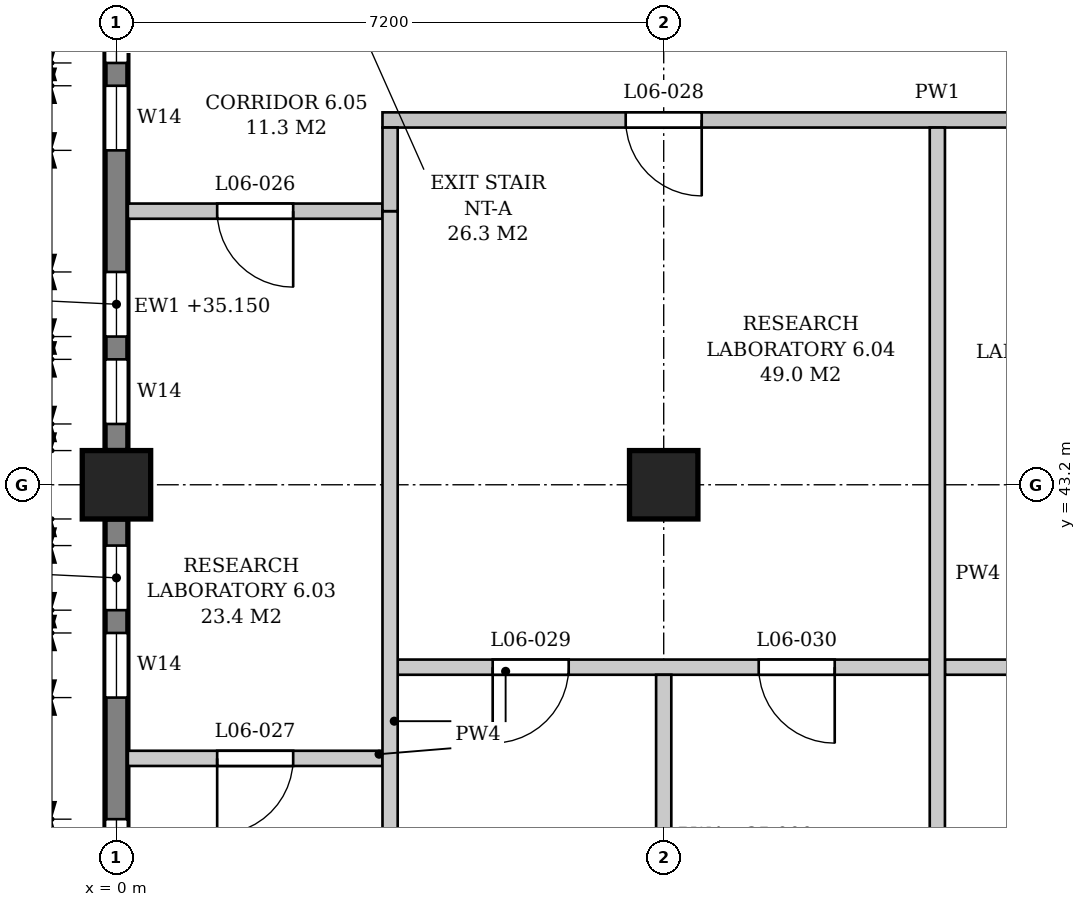
"""IFC4 building model, lengths in metres.
Left out: names, types, materials, properties, quantities, classifications, styles, units other than length and angle.
Written with IfcOpenShell. Run it as: python <this file> out.ifc"""

import sys

from ifc_helpers import new_model, si_unit, direction, frame, frame_2d, origin, origin_2d, place, context, subcontext, project, spatial, polyline, rectangle, outline, extrude, element, fill, save


model = new_model("IFC4")
c1 = context("Model", 3, precision=1e-05, world=origin(), true_north=direction((0.0, 1.0)))
c2 = subcontext(c1, "Body", "Model", "MODEL_VIEW")
j1 = project(units=[si_unit("LENGTHUNIT", "METRE"), si_unit("PLANEANGLEUNIT", "RADIAN")], contexts=[c1])
p1 = place(None, origin())
s1 = spatial("IfcSite", under=j1, at=p1, CompositionType="ELEMENT")
p2 = place(p1, origin())
s2 = spatial("IfcBuilding", under=s1, at=p2, CompositionType="ELEMENT")
p3 = place(p2, frame((0.0, 0.0, 31.2)))
s3 = spatial("IfcBuildingStorey", under=s2, at=p3, CompositionType="ELEMENT", Elevation=31.2)
for number, where, z_axis, x_axis in (
    (1, (0.0, 43.2, 0.0), (0.0, 0.0, 1.0), (1.0, 0.0, 0.0)),
    (2, (7.2, 43.2, 0.0), (0.0, 0.0, 1.0), (1.0, 0.0, 0.0)),
):
    element("IfcColumn", number, at=place(p3, frame(where, z_axis=z_axis, x_axis=x_axis)), inside=s3, PredefinedType="COLUMN", context=c2, shape_type="SweptSolid", body=[
        extrude(rectangle(XDim=0.9, YDim=0.9, at=origin_2d()), origin(), (0.0, 0.0, 1.0), 4.8),
    ])
p4 = place(p3, frame((0.0, 36.45, 0.0), z_axis=(0.0, 0.0, 1.0), x_axis=(0.0, 1.0, 0.0)))
e3 = element("IfcWall", 3, at=p4, inside=s3, PredefinedType="STANDARD", context=c2, shape_type="SweptSolid", body=[
    extrude(rectangle(XDim=6.3, YDim=0.3, at=frame_2d((3.15, 0.0))), origin(), (0.0, 0.0, 1.0), 3.95),
])
p5 = place(p4, frame((0.35, 0.0, 0.9)))
e4 = element("IfcOpeningElement", 4, at=p5, cuts=e3, PredefinedType="OPENING", context=c2, shape_type="SweptSolid", body=[
    extrude(outline(polyline([(0.0, 0.0), (0.85, 0.0), (0.85, 2.05), (0.425, 2.5), (0.0, 2.05), (0.0, 0.0)])), frame((0.0, 0.16, 0.0), z_axis=(0.0, -1.0, 0.0), x_axis=(1.0, 0.0, 0.0)), (0.0, 0.0, 1.0), 0.32),
])
p6 = place(p4, frame((1.5, 0.0, 0.9)))
e5 = element("IfcOpeningElement", 5, at=p6, cuts=e3, PredefinedType="OPENING", context=c2, shape_type="SweptSolid", body=[
    extrude(outline(polyline([(0.0, 0.0), (0.85, 0.0), (0.85, 2.05), (0.425, 2.5), (0.0, 2.05), (0.0, 0.0)])), frame((0.0, 0.16, 0.0), z_axis=(0.0, -1.0, 0.0), x_axis=(1.0, 0.0, 0.0)), (0.0, 0.0, 1.0), 0.32),
])
p7 = place(p4, frame((3.95, 0.0, 0.9)))
e6 = element("IfcOpeningElement", 6, at=p7, cuts=e3, PredefinedType="OPENING", context=c2, shape_type="SweptSolid", body=[
    extrude(outline(polyline([(0.0, 0.0), (0.85, 0.0), (0.85, 2.05), (0.425, 2.5), (0.0, 2.05), (0.0, 0.0)])), frame((0.0, 0.16, 0.0), z_axis=(0.0, -1.0, 0.0), x_axis=(1.0, 0.0, 0.0)), (0.0, 0.0, 1.0), 0.32),
])
p8 = place(p4, frame((5.1, 0.0, 0.9)))
e7 = element("IfcOpeningElement", 7, at=p8, cuts=e3, PredefinedType="OPENING", context=c2, shape_type="SweptSolid", body=[
    extrude(outline(polyline([(0.0, 0.0), (0.85, 0.0), (0.85, 2.05), (0.425, 2.5), (0.0, 2.05), (0.0, 0.0)])), frame((0.0, 0.16, 0.0), z_axis=(0.0, -1.0, 0.0), x_axis=(1.0, 0.0, 0.0)), (0.0, 0.0, 1.0), 0.32),
])
p9 = place(p3, frame((0.0, 43.65, 0.0), z_axis=(0.0, 0.0, 1.0), x_axis=(0.0, 1.0, 0.0)))
e8 = element("IfcWall", 8, at=p9, inside=s3, PredefinedType="STANDARD", context=c2, shape_type="SweptSolid", body=[
    extrude(rectangle(XDim=6.3, YDim=0.3, at=frame_2d((3.15, 0.0))), origin(), (0.0, 0.0, 1.0), 3.95),
])
p10 = place(p9, frame((0.35, 0.0, 0.9)))
e9 = element("IfcOpeningElement", 9, at=p10, cuts=e8, PredefinedType="OPENING", context=c2, shape_type="SweptSolid", body=[
    extrude(outline(polyline([(0.0, 0.0), (0.85, 0.0), (0.85, 2.05), (0.425, 2.5), (0.0, 2.05), (0.0, 0.0)])), frame((0.0, 0.16, 0.0), z_axis=(0.0, -1.0, 0.0), x_axis=(1.0, 0.0, 0.0)), (0.0, 0.0, 1.0), 0.32),
])
p11 = place(p9, frame((1.5, 0.0, 0.9)))
e10 = element("IfcOpeningElement", 10, at=p11, cuts=e8, PredefinedType="OPENING", context=c2, shape_type="SweptSolid", body=[
    extrude(outline(polyline([(0.0, 0.0), (0.85, 0.0), (0.85, 2.05), (0.425, 2.5), (0.0, 2.05), (0.0, 0.0)])), frame((0.0, 0.16, 0.0), z_axis=(0.0, -1.0, 0.0), x_axis=(1.0, 0.0, 0.0)), (0.0, 0.0, 1.0), 0.32),
])
p12 = place(p9, frame((3.95, 0.0, 0.9)))
e11 = element("IfcOpeningElement", 11, at=p12, cuts=e8, PredefinedType="OPENING", context=c2, shape_type="SweptSolid", body=[
    extrude(outline(polyline([(0.0, 0.0), (0.85, 0.0), (0.85, 2.05), (0.425, 2.5), (0.0, 2.05), (0.0, 0.0)])), frame((0.0, 0.16, 0.0), z_axis=(0.0, -1.0, 0.0), x_axis=(1.0, 0.0, 0.0)), (0.0, 0.0, 1.0), 0.32),
])
p13 = place(p9, frame((5.1, 0.0, 0.9)))
e12 = element("IfcOpeningElement", 12, at=p13, cuts=e8, PredefinedType="OPENING", context=c2, shape_type="SweptSolid", body=[
    extrude(outline(polyline([(0.0, 0.0), (0.85, 0.0), (0.85, 2.05), (0.425, 2.5), (0.0, 2.05), (0.0, 0.0)])), frame((0.0, 0.16, 0.0), z_axis=(0.0, -1.0, 0.0), x_axis=(1.0, 0.0, 0.0)), (0.0, 0.0, 1.0), 0.32),
])
p14 = place(p3, frame((0.15, 39.6, 0.0), z_axis=(0.0, 0.0, 1.0), x_axis=(1.0, 0.0, 0.0)))
e13 = element("IfcWall", 13, at=p14, inside=s3, PredefinedType="PARTITIONING", context=c2, shape_type="SweptSolid", body=[
    extrude(outline(polyline([(0.0, 0.0), (3.35, 0.0), (3.35, 4.55), (0.1, 4.55), (0.1, 3.95), (0.0, 3.95), (0.0, 0.0)])), frame((0.0, 0.1, 0.0), z_axis=(0.0, -1.0, 0.0), x_axis=(1.0, 0.0, 0.0)), (0.0, 0.0, 1.0), 0.2),
])
p15 = place(p14, frame((1.175, 0.0, 0.0)))
e14 = element("IfcOpeningElement", 14, at=p15, cuts=e13, PredefinedType="OPENING", context=c2, shape_type="SweptSolid", body=[
    extrude(rectangle(XDim=1.0, YDim=2.1, at=frame_2d((0.5, 1.05))), frame((0.0, 0.11, 0.0), z_axis=(0.0, -1.0, 0.0), x_axis=(1.0, 0.0, 0.0)), (0.0, 0.0, 1.0), 0.22),
])
p16 = place(p3, frame((3.7, 40.8, 0.0), z_axis=(0.0, 0.0, 1.0), x_axis=(1.0, 0.0, 0.0)))
e15 = element("IfcWall", 15, at=p16, inside=s3, PredefinedType="PARTITIONING", context=c2, shape_type="SweptSolid", body=[
    extrude(outline(polyline([(0.0, 0.0), (7.0, 0.0), (7.0, 4.55), (3.75, 4.55), (3.75, 3.8), (3.25, 3.8), (3.25, 4.55), (0.0, 4.55), (0.0, 0.0)])), frame((0.0, 0.1, 0.0), z_axis=(0.0, -1.0, 0.0), x_axis=(1.0, 0.0, 0.0)), (0.0, 0.0, 1.0), 0.2),
])
p17 = place(p16, frame((1.25, 0.0, 0.0)))
e16 = element("IfcOpeningElement", 16, at=p17, cuts=e15, PredefinedType="OPENING", context=c2, shape_type="SweptSolid", body=[
    extrude(rectangle(XDim=1.0, YDim=2.1, at=frame_2d((0.5, 1.05))), frame((0.0, 0.11, 0.0), z_axis=(0.0, -1.0, 0.0), x_axis=(1.0, 0.0, 0.0)), (0.0, 0.0, 1.0), 0.22),
])
p18 = place(p16, frame((4.75, 0.0, 0.0)))
e17 = element("IfcOpeningElement", 17, at=p18, cuts=e15, PredefinedType="OPENING", context=c2, shape_type="SweptSolid", body=[
    extrude(rectangle(XDim=1.0, YDim=2.1, at=frame_2d((0.5, 1.05))), frame((0.0, 0.11, 0.0), z_axis=(0.0, -1.0, 0.0), x_axis=(1.0, 0.0, 0.0)), (0.0, 0.0, 1.0), 0.22),
])
p19 = place(p3, frame((10.9, 40.8, 0.0), z_axis=(0.0, 0.0, 1.0), x_axis=(1.0, 0.0, 0.0)))
e18 = element("IfcWall", 18, at=p19, inside=s3, PredefinedType="PARTITIONING", context=c2, shape_type="SweptSolid", body=[
    extrude(outline(polyline([(0.0, 0.0), (3.4, 0.0), (3.4, 3.8), (3.25, 3.8), (3.25, 4.55), (0.0, 4.55), (0.0, 0.0)])), frame((0.0, 0.1, 0.0), z_axis=(0.0, -1.0, 0.0), x_axis=(1.0, 0.0, 0.0)), (0.0, 0.0, 1.0), 0.2),
])
p20 = place(p19, frame((1.2, 0.0, 0.0)))
e19 = element("IfcOpeningElement", 19, at=p20, cuts=e18, PredefinedType="OPENING", context=c2, shape_type="SweptSolid", body=[
    extrude(rectangle(XDim=1.0, YDim=2.1, at=frame_2d((0.5, 1.05))), frame((0.0, 0.11, 0.0), z_axis=(0.0, -1.0, 0.0), x_axis=(1.0, 0.0, 0.0)), (0.0, 0.0, 1.0), 0.22),
])
p21 = place(p3, frame((0.15, 46.8, 0.0), z_axis=(0.0, 0.0, 1.0), x_axis=(1.0, 0.0, 0.0)))
e20 = element("IfcWall", 20, at=p21, inside=s3, PredefinedType="PARTITIONING", context=c2, shape_type="SweptSolid", body=[
    extrude(outline(polyline([(0.0, 0.0), (3.35, 0.0), (3.35, 4.55), (0.1, 4.55), (0.1, 3.95), (0.0, 3.95), (0.0, 0.0)])), frame((0.0, 0.1, 0.0), z_axis=(0.0, -1.0, 0.0), x_axis=(1.0, 0.0, 0.0)), (0.0, 0.0, 1.0), 0.2),
])
p22 = place(p21, frame((1.175, 0.0, 0.0)))
e21 = element("IfcOpeningElement", 21, at=p22, cuts=e20, PredefinedType="OPENING", context=c2, shape_type="SweptSolid", body=[
    extrude(rectangle(XDim=1.0, YDim=2.1, at=frame_2d((0.5, 1.05))), frame((0.0, 0.11, 0.0), z_axis=(0.0, -1.0, 0.0), x_axis=(1.0, 0.0, 0.0)), (0.0, 0.0, 1.0), 0.22),
])
p23 = place(p3, frame((3.5, 48.0, 0.0), z_axis=(0.0, 0.0, 1.0), x_axis=(1.0, 0.0, 0.0)))
e22 = element("IfcWall", 22, at=p23, inside=s3, PredefinedType="PARTITIONING", context=c2, shape_type="SweptSolid", body=[
    extrude(outline(polyline([(0.0, 0.0), (14.6, 0.0), (14.6, 4.55), (11.15, 4.55), (11.15, 3.8), (10.65, 3.8), (10.65, 4.55), (3.95, 4.55), (3.95, 3.8), (3.45, 3.8), (3.45, 4.55), (0.0, 4.55), (0.0, 0.0)])), frame((0.0, 0.1, 0.0), z_axis=(0.0, -1.0, 0.0), x_axis=(1.0, 0.0, 0.0)), (0.0, 0.0, 1.0), 0.2),
])
p24 = place(p23, frame((3.2, 0.0, 0.0)))
e23 = element("IfcOpeningElement", 23, at=p24, cuts=e22, PredefinedType="OPENING", context=c2, shape_type="SweptSolid", body=[
    extrude(rectangle(XDim=1.0, YDim=2.1, at=frame_2d((0.5, 1.05))), frame((0.0, 0.11, 0.0), z_axis=(0.0, -1.0, 0.0), x_axis=(1.0, 0.0, 0.0)), (0.0, 0.0, 1.0), 0.22),
])
p25 = place(p23, frame((8.6, 0.0, 0.0)))
e24 = element("IfcOpeningElement", 24, at=p25, cuts=e22, PredefinedType="OPENING", context=c2, shape_type="SweptSolid", body=[
    extrude(rectangle(XDim=1.0, YDim=2.1, at=frame_2d((0.5, 1.05))), frame((0.0, 0.11, 0.0), z_axis=(0.0, -1.0, 0.0), x_axis=(1.0, 0.0, 0.0)), (0.0, 0.0, 1.0), 0.22),
])
p26 = place(p3, frame((3.6, 36.15, 0.0), z_axis=(0.0, 0.0, 1.0), x_axis=(0.0, 1.0, 0.0)))
e25 = element("IfcWall", 25, at=p26, inside=s3, PredefinedType="PARTITIONING", context=c2, shape_type="SweptSolid", body=[
    extrude(outline(polyline([(0.0, 0.0), (10.65, 0.0), (10.65, 4.55), (7.3, 4.55), (7.3, 3.8), (6.8, 3.8), (6.8, 4.55), (0.1, 4.55), (0.1, 3.95), (0.0, 3.95), (0.0, 0.0)])), frame((0.0, 0.1, 0.0), z_axis=(0.0, -1.0, 0.0), x_axis=(1.0, 0.0, 0.0)), (0.0, 0.0, 1.0), 0.2),
])
p27 = place(p3, frame((3.6, 46.8, 0.0), z_axis=(0.0, 0.0, 1.0), x_axis=(0.0, 1.0, 0.0)))
e26 = element("IfcWall", 26, at=p27, inside=s3, PredefinedType="PARTITIONING", context=c2, shape_type="SweptSolid", body=[
    extrude(rectangle(XDim=1.1, YDim=0.2, at=frame_2d((0.55, 0.0))), origin(), (0.0, 0.0, 1.0), 4.55),
])
p28 = place(p3, frame((7.2, 36.45, 0.0), z_axis=(0.0, 0.0, 1.0), x_axis=(0.0, 1.0, 0.0)))
e27 = element("IfcWall", 27, at=p28, inside=s3, PredefinedType="PARTITIONING", context=c2, shape_type="SweptSolid", body=[
    extrude(rectangle(XDim=4.25, YDim=0.2, at=frame_2d((2.125, 0.0))), origin(), (0.0, 0.0, 1.0), 3.8),
])
p29 = place(p3, frame((10.8, 36.15, 0.0), z_axis=(0.0, 0.0, 1.0), x_axis=(0.0, 1.0, 0.0)))
e28 = element("IfcWall", 28, at=p29, inside=s3, PredefinedType="PARTITIONING", context=c2, shape_type="SweptSolid", body=[
    extrude(outline(polyline([(0.0, 0.0), (11.75, 0.0), (11.75, 4.55), (7.3, 4.55), (7.3, 3.8), (6.8, 3.8), (6.8, 4.55), (0.1, 4.55), (0.1, 3.95), (0.0, 3.95), (0.0, 0.0)])), frame((0.0, 0.1, 0.0), z_axis=(0.0, -1.0, 0.0), x_axis=(1.0, 0.0, 0.0)), (0.0, 0.0, 1.0), 0.2),
])
p30 = place(p6, origin())
e29 = element("IfcWindow", 29, at=p30, inside=s3, PartitioningType="SINGLE_PANEL", PredefinedType="WINDOW", context=c2, shape_type="SweptSolid", body=[
    extrude(outline(polyline([(0.0, 0.0), (0.85, 0.0), (0.85, 2.05), (0.425, 2.5), (0.0, 2.05), (0.0, 0.0)])), frame((0.0, 0.03, 0.0), z_axis=(0.0, -1.0, 0.0), x_axis=(1.0, 0.0, 0.0)), (0.0, 0.0, 1.0), 0.06),
])
fill(e5, e29)
p31 = place(p7, origin())
e30 = element("IfcWindow", 30, at=p31, inside=s3, PartitioningType="SINGLE_PANEL", PredefinedType="WINDOW", context=c2, shape_type="SweptSolid", body=[
    extrude(outline(polyline([(0.0, 0.0), (0.85, 0.0), (0.85, 2.05), (0.425, 2.5), (0.0, 2.05), (0.0, 0.0)])), frame((0.0, 0.03, 0.0), z_axis=(0.0, -1.0, 0.0), x_axis=(1.0, 0.0, 0.0)), (0.0, 0.0, 1.0), 0.06),
])
fill(e6, e30)
p32 = place(p8, origin())
e31 = element("IfcWindow", 31, at=p32, inside=s3, PartitioningType="SINGLE_PANEL", PredefinedType="WINDOW", context=c2, shape_type="SweptSolid", body=[
    extrude(outline(polyline([(0.0, 0.0), (0.85, 0.0), (0.85, 2.05), (0.425, 2.5), (0.0, 2.05), (0.0, 0.0)])), frame((0.0, 0.03, 0.0), z_axis=(0.0, -1.0, 0.0), x_axis=(1.0, 0.0, 0.0)), (0.0, 0.0, 1.0), 0.06),
])
fill(e7, e31)
p33 = place(p10, origin())
e32 = element("IfcWindow", 32, at=p33, inside=s3, PartitioningType="SINGLE_PANEL", PredefinedType="WINDOW", context=c2, shape_type="SweptSolid", body=[
    extrude(outline(polyline([(0.0, 0.0), (0.85, 0.0), (0.85, 2.05), (0.425, 2.5), (0.0, 2.05), (0.0, 0.0)])), frame((0.0, 0.03, 0.0), z_axis=(0.0, -1.0, 0.0), x_axis=(1.0, 0.0, 0.0)), (0.0, 0.0, 1.0), 0.06),
])
fill(e9, e32)
p34 = place(p11, origin())
e33 = element("IfcWindow", 33, at=p34, inside=s3, PartitioningType="SINGLE_PANEL", PredefinedType="WINDOW", context=c2, shape_type="SweptSolid", body=[
    extrude(outline(polyline([(0.0, 0.0), (0.85, 0.0), (0.85, 2.05), (0.425, 2.5), (0.0, 2.05), (0.0, 0.0)])), frame((0.0, 0.03, 0.0), z_axis=(0.0, -1.0, 0.0), x_axis=(1.0, 0.0, 0.0)), (0.0, 0.0, 1.0), 0.06),
])
fill(e10, e33)
p35 = place(p12, origin())
e34 = element("IfcWindow", 34, at=p35, inside=s3, PartitioningType="SINGLE_PANEL", PredefinedType="WINDOW", context=c2, shape_type="SweptSolid", body=[
    extrude(outline(polyline([(0.0, 0.0), (0.85, 0.0), (0.85, 2.05), (0.425, 2.5), (0.0, 2.05), (0.0, 0.0)])), frame((0.0, 0.03, 0.0), z_axis=(0.0, -1.0, 0.0), x_axis=(1.0, 0.0, 0.0)), (0.0, 0.0, 1.0), 0.06),
])
fill(e11, e34)
p36 = place(p13, origin())
e35 = element("IfcWindow", 35, at=p36, inside=s3, PartitioningType="SINGLE_PANEL", PredefinedType="WINDOW", context=c2, shape_type="SweptSolid", body=[
    extrude(outline(polyline([(0.0, 0.0), (0.85, 0.0), (0.85, 2.05), (0.425, 2.5), (0.0, 2.05), (0.0, 0.0)])), frame((0.0, 0.03, 0.0), z_axis=(0.0, -1.0, 0.0), x_axis=(1.0, 0.0, 0.0)), (0.0, 0.0, 1.0), 0.06),
])
fill(e12, e35)
p37 = place(p22, frame((1.0, 0.0, 0.0), z_axis=(0.0, 0.0, 1.0), x_axis=(-1.0, 0.0, 0.0)))
e36 = element("IfcDoor", 36, at=p37, inside=s3, OperationType="SINGLE_SWING_LEFT", PredefinedType="DOOR", context=c2, shape_type="SweptSolid", body=[
    extrude(rectangle(XDim=1.0, YDim=2.1, at=frame_2d((0.5, 1.05))), frame((0.0, 0.025, 0.0), z_axis=(0.0, -1.0, 0.0), x_axis=(1.0, 0.0, 0.0)), (0.0, 0.0, 1.0), 0.05),
])
fill(e21, e36)
p38 = place(p15, frame((1.0, 0.0, 0.0), z_axis=(0.0, 0.0, 1.0), x_axis=(-1.0, 0.0, 0.0)))
e37 = element("IfcDoor", 37, at=p38, inside=s3, OperationType="SINGLE_SWING_RIGHT", PredefinedType="DOOR", context=c2, shape_type="SweptSolid", body=[
    extrude(rectangle(XDim=1.0, YDim=2.1, at=frame_2d((0.5, 1.05))), frame((0.0, 0.025, 0.0), z_axis=(0.0, -1.0, 0.0), x_axis=(1.0, 0.0, 0.0)), (0.0, 0.0, 1.0), 0.05),
])
fill(e14, e37)
p39 = place(p24, frame((1.0, 0.0, 0.0), z_axis=(0.0, 0.0, 1.0), x_axis=(-1.0, 0.0, 0.0)))
e38 = element("IfcDoor", 38, at=p39, inside=s3, OperationType="SINGLE_SWING_LEFT", PredefinedType="DOOR", context=c2, shape_type="SweptSolid", body=[
    extrude(rectangle(XDim=1.0, YDim=2.1, at=frame_2d((0.5, 1.05))), frame((0.0, 0.025, 0.0), z_axis=(0.0, -1.0, 0.0), x_axis=(1.0, 0.0, 0.0)), (0.0, 0.0, 1.0), 0.05),
])
fill(e23, e38)
p40 = place(p17, frame((1.0, 0.0, 0.0), z_axis=(0.0, 0.0, 1.0), x_axis=(-1.0, 0.0, 0.0)))
e39 = element("IfcDoor", 39, at=p40, inside=s3, OperationType="SINGLE_SWING_RIGHT", PredefinedType="DOOR", context=c2, shape_type="SweptSolid", body=[
    extrude(rectangle(XDim=1.0, YDim=2.1, at=frame_2d((0.5, 1.05))), frame((0.0, 0.025, 0.0), z_axis=(0.0, -1.0, 0.0), x_axis=(1.0, 0.0, 0.0)), (0.0, 0.0, 1.0), 0.05),
])
fill(e16, e39)
p41 = place(p18, frame((1.0, 0.0, 0.0), z_axis=(0.0, 0.0, 1.0), x_axis=(-1.0, 0.0, 0.0)))
e40 = element("IfcDoor", 40, at=p41, inside=s3, OperationType="SINGLE_SWING_LEFT", PredefinedType="DOOR", context=c2, shape_type="SweptSolid", body=[
    extrude(rectangle(XDim=1.0, YDim=2.1, at=frame_2d((0.5, 1.05))), frame((0.0, 0.025, 0.0), z_axis=(0.0, -1.0, 0.0), x_axis=(1.0, 0.0, 0.0)), (0.0, 0.0, 1.0), 0.05),
])
fill(e17, e40)
save(model, sys.argv[1])
